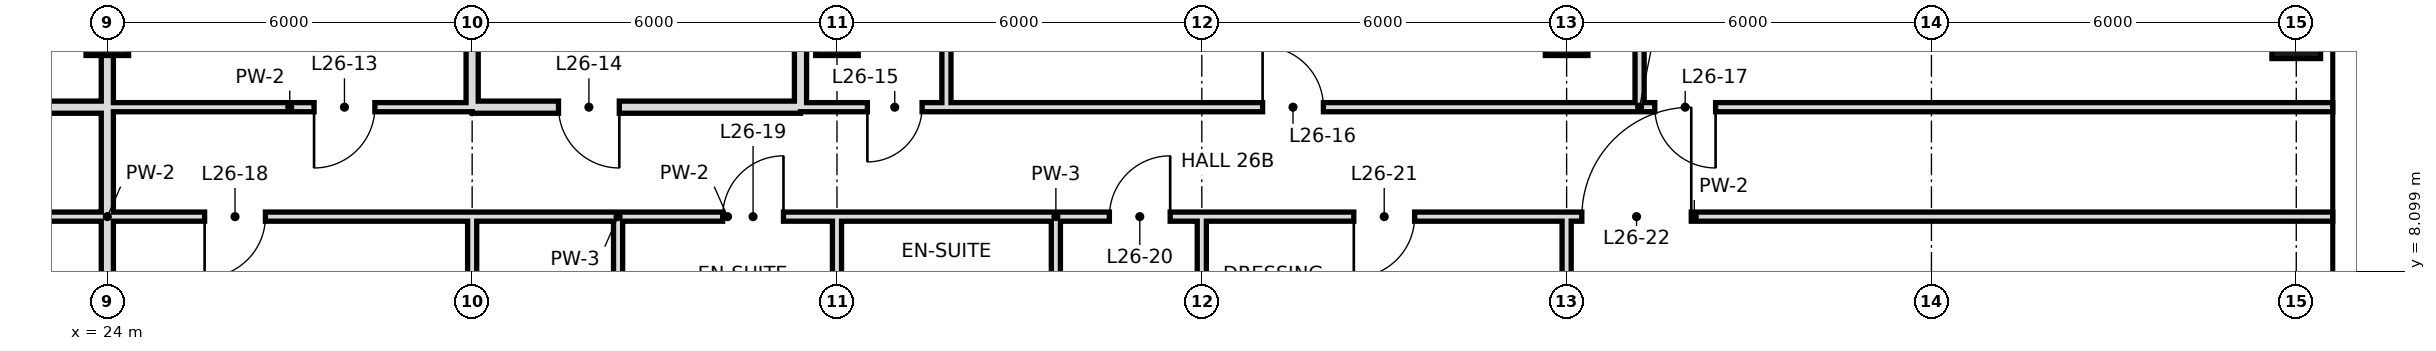
"""IFC4 building model, lengths in metres.
Left out: names, types, materials, properties, quantities, classifications, styles, units other than length and angle.
Written with IfcOpenShell. Run it as: python <this file> out.ifc"""

import sys

from ifc_helpers import new_model, si_unit, direction, frame, frame_2d, origin, origin_2d, place, context, subcontext, project, spatial, rectangle, hollow_rectangle, extrude, element, fill, save


model = new_model("IFC4")
c1 = context("Model", 3, precision=1e-05, world=origin(), true_north=direction((0.0, 1.0)))
c2 = subcontext(c1, "Body", "Model", "MODEL_VIEW")
j1 = project(units=[si_unit("LENGTHUNIT", "METRE"), si_unit("PLANEANGLEUNIT", "RADIAN")], contexts=[c1])
p1 = place(None, origin())
s1 = spatial("IfcSite", under=j1, at=p1, CompositionType="ELEMENT")
p2 = place(p1, origin())
s2 = spatial("IfcBuilding", under=s1, at=p2, CompositionType="ELEMENT")
p3 = place(p2, frame((0.0, 0.0, 119.6)))
s3 = spatial("IfcBuildingStorey", under=s2, at=p3, CompositionType="ELEMENT", Elevation=119.6)
for number, where, z_axis, x_axis in (
    (1, (24.0, 12.0, 0.0), (0.0, 0.0, 1.0), (1.0, 0.0, 0.0)),
    (2, (36.0, 12.0, 0.0), (0.0, 0.0, 1.0), (1.0, 0.0, 0.0)),
    (3, (48.0, 12.0, 0.0), (0.0, 0.0, 1.0), (1.0, 0.0, 0.0)),
):
    element("IfcColumn", number, at=place(p3, frame(where, z_axis=z_axis, x_axis=x_axis)), inside=s3, PredefinedType="COLUMN", context=c2, shape_type="SweptSolid", body=[
        extrude(hollow_rectangle(XDim=0.7, YDim=0.7, WallThickness=0.036, at=origin_2d()), origin(), (0.0, 0.0, 1.0), 3.6),
    ])
p4 = place(p3, frame((60.0, 12.0, 0.0), z_axis=(0.0, 0.0, 1.0), x_axis=(1.0, 0.0, 0.0)))
e4 = element("IfcColumn", 4, at=p4, inside=s3, PredefinedType="COLUMN", context=c2, shape_type="SweptSolid", body=[
    extrude(hollow_rectangle(XDim=0.8, YDim=0.8, WallThickness=0.04, at=origin_2d()), origin(), (0.0, 0.0, 1.0), 3.6),
])
p5 = place(p3, frame((24.0, 10.8, 0.0), z_axis=(0.0, 0.0, 1.0), x_axis=(0.0, 1.0, 0.0)))
e5 = element("IfcWall", 5, at=p5, inside=s3, PredefinedType="SOLIDWALL", context=c2, shape_type="SweptSolid", body=[
    extrude(rectangle(XDim=7.9, YDim=0.2, at=frame_2d((3.95, 0.0))), origin(), (0.0, 0.0, 1.0), 2.72),
])
p6 = place(p3, frame((24.0, 0.0, 0.0), z_axis=(0.0, 0.0, 1.0), x_axis=(0.0, 1.0, 0.0)))
e6 = element("IfcWall", 6, at=p6, inside=s3, PredefinedType="SOLIDWALL", context=c2, shape_type="SweptSolid", body=[
    extrude(rectangle(XDim=10.8, YDim=0.2, at=frame_2d((5.4, 0.0))), origin(), (0.0, 0.0, 1.0), 2.72),
])
p7 = place(p3, frame((30.0, 10.8, 0.0), z_axis=(0.0, 0.0, 1.0), x_axis=(0.0, 1.0, 0.0)))
e7 = element("IfcWall", 7, at=p7, inside=s3, PredefinedType="SOLIDWALL", context=c2, shape_type="SweptSolid", body=[
    extrude(rectangle(XDim=7.9, YDim=0.2, at=frame_2d((3.95, 0.0))), origin(), (0.0, 0.0, 1.0), 2.72),
])
p8 = place(p3, frame((30.0, 6.0, 0.0), z_axis=(0.0, 0.0, 1.0), x_axis=(0.0, 1.0, 0.0)))
e8 = element("IfcWall", 8, at=p8, inside=s3, PredefinedType="PARTITIONING", context=c2, shape_type="SweptSolid", body=[
    extrude(rectangle(XDim=3.0, YDim=0.15, at=frame_2d((1.5, 0.0))), origin(), (0.0, 0.0, 1.0), 2.72),
])
p9 = place(p3, frame((32.4, 6.0, 0.0), z_axis=(0.0, 0.0, 1.0), x_axis=(0.0, 1.0, 0.0)))
e9 = element("IfcWall", 9, at=p9, inside=s3, PredefinedType="PARTITIONING", context=c2, shape_type="SweptSolid", body=[
    extrude(rectangle(XDim=3.0, YDim=0.15, at=frame_2d((1.5, 0.0))), origin(), (0.0, 0.0, 1.0), 3.42),
])
p10 = place(p3, frame((35.4, 10.8, 0.0), z_axis=(0.0, 0.0, 1.0), x_axis=(0.0, 1.0, 0.0)))
e10 = element("IfcWall", 10, at=p10, inside=s3, PredefinedType="SOLIDWALL", context=c2, shape_type="SweptSolid", body=[
    extrude(rectangle(XDim=7.9, YDim=0.2, at=frame_2d((3.95, 0.0))), origin(), (0.0, 0.0, 1.0), 2.72),
])
p11 = place(p3, frame((36.0, 6.0, 0.0), z_axis=(0.0, 0.0, 1.0), x_axis=(0.0, 1.0, 0.0)))
e11 = element("IfcWall", 11, at=p11, inside=s3, PredefinedType="PARTITIONING", context=c2, shape_type="SweptSolid", body=[
    extrude(rectangle(XDim=3.0, YDim=0.15, at=frame_2d((1.5, 0.0))), origin(), (0.0, 0.0, 1.0), 2.72),
])
p12 = place(p3, frame((37.8, 10.8, 0.0), z_axis=(0.0, 0.0, 1.0), x_axis=(0.0, 1.0, 0.0)))
e12 = element("IfcWall", 12, at=p12, inside=s3, PredefinedType="PARTITIONING", context=c2, shape_type="SweptSolid", body=[
    extrude(rectangle(XDim=7.9, YDim=0.15, at=frame_2d((3.95, 0.0))), origin(), (0.0, 0.0, 1.0), 3.42),
])
p13 = place(p3, frame((39.6, 6.0, 0.0), z_axis=(0.0, 0.0, 1.0), x_axis=(0.0, 1.0, 0.0)))
e13 = element("IfcWall", 13, at=p13, inside=s3, PredefinedType="PARTITIONING", context=c2, shape_type="SweptSolid", body=[
    extrude(rectangle(XDim=3.0, YDim=0.15, at=frame_2d((1.5, 0.0))), origin(), (0.0, 0.0, 1.0), 3.42),
])
p14 = place(p3, frame((42.0, -0.6, 0.0), z_axis=(0.0, 0.0, 1.0), x_axis=(0.0, 1.0, 0.0)))
e14 = element("IfcWall", 14, at=p14, inside=s3, PredefinedType="PARTITIONING", context=c2, shape_type="SweptSolid", body=[
    extrude(rectangle(XDim=9.6, YDim=0.15, at=frame_2d((4.8, 0.0))), origin(), (0.0, 0.0, 1.0), 2.72),
])
p15 = place(p3, frame((48.0, 0.0, 0.0), z_axis=(0.0, 0.0, 1.0), x_axis=(0.0, 1.0, 0.0)))
e15 = element("IfcWall", 15, at=p15, inside=s3, PredefinedType="PARTITIONING", context=c2, shape_type="SweptSolid", body=[
    extrude(rectangle(XDim=9.0, YDim=0.15, at=frame_2d((4.5, 0.0))), origin(), (0.0, 0.0, 1.0), 2.72),
])
p16 = place(p3, frame((49.2, 10.8, 0.0), z_axis=(0.0, 0.0, 1.0), x_axis=(0.0, 1.0, 0.0)))
e16 = element("IfcWall", 16, at=p16, inside=s3, PredefinedType="PARTITIONING", context=c2, shape_type="SweptSolid", body=[
    extrude(rectangle(XDim=20.4, YDim=0.15, at=frame_2d((10.2, 0.0))), origin(), (0.0, 0.0, 1.0), 3.42),
])
p17 = place(p16, frame((17.68, 0.0, 0.0)))
e17 = element("IfcOpeningElement", 17, at=p17, cuts=e16, PredefinedType="OPENING", context=c2, shape_type="SweptSolid", body=[
    extrude(rectangle(XDim=1.0, YDim=2.4, at=frame_2d((0.5, 1.2))), frame((0.0, 0.085, 0.0), z_axis=(0.0, -1.0, 0.0), x_axis=(1.0, 0.0, 0.0)), (0.0, 0.0, 1.0), 0.17),
])
p18 = place(p16, frame((9.88, 0.0, 0.0)))
e18 = element("IfcOpeningElement", 18, at=p18, cuts=e16, PredefinedType="OPENING", context=c2, shape_type="SweptSolid", body=[
    extrude(rectangle(XDim=1.0, YDim=2.4, at=frame_2d((0.5, 1.2))), frame((0.0, 0.085, 0.0), z_axis=(0.0, -1.0, 0.0), x_axis=(1.0, 0.0, 0.0)), (0.0, 0.0, 1.0), 0.17),
])
p19 = place(p3, frame((18.6, 10.8, 0.0), z_axis=(0.0, 0.0, 1.0), x_axis=(1.0, 0.0, 0.0)))
e19 = element("IfcWall", 19, at=p19, inside=s3, PredefinedType="SOLIDWALL", context=c2, shape_type="SweptSolid", body=[
    extrude(rectangle(XDim=5.4, YDim=0.2, at=frame_2d((2.7, 0.0))), origin(), (0.0, 0.0, 1.0), 2.72),
])
p20 = place(p19, frame((2.2, 0.0, 0.0)))
e20 = element("IfcOpeningElement", 20, at=p20, cuts=e19, PredefinedType="OPENING", context=c2, shape_type="SweptSolid", body=[
    extrude(rectangle(XDim=1.0, YDim=2.4, at=frame_2d((0.5, 1.2))), frame((0.0, 0.11, 0.0), z_axis=(0.0, -1.0, 0.0), x_axis=(1.0, 0.0, 0.0)), (0.0, 0.0, 1.0), 0.22),
])
p21 = place(p3, frame((30.0, 10.8, 0.0), z_axis=(0.0, 0.0, 1.0), x_axis=(1.0, 0.0, 0.0)))
e21 = element("IfcWall", 21, at=p21, inside=s3, PredefinedType="SOLIDWALL", context=c2, shape_type="SweptSolid", body=[
    extrude(rectangle(XDim=5.4, YDim=0.2, at=frame_2d((2.7, 0.0))), origin(), (0.0, 0.0, 1.0), 2.72),
])
p22 = place(p21, frame((1.42, 0.0, 0.0)))
e22 = element("IfcOpeningElement", 22, at=p22, cuts=e21, PredefinedType="OPENING", context=c2, shape_type="SweptSolid", body=[
    extrude(rectangle(XDim=1.0, YDim=2.4, at=frame_2d((0.5, 1.2))), frame((0.0, 0.11, 0.0), z_axis=(0.0, -1.0, 0.0), x_axis=(1.0, 0.0, 0.0)), (0.0, 0.0, 1.0), 0.22),
])
p23 = place(p3, frame((24.0, 10.8, 0.0), z_axis=(0.0, 0.0, 1.0), x_axis=(1.0, 0.0, 0.0)))
e23 = element("IfcWall", 23, at=p23, inside=s3, PredefinedType="PARTITIONING", context=c2, shape_type="SweptSolid", body=[
    extrude(rectangle(XDim=6.0, YDim=0.15, at=frame_2d((3.0, 0.0))), origin(), (0.0, 0.0, 1.0), 3.42),
])
p24 = place(p23, frame((3.4, 0.0, 0.0)))
e24 = element("IfcOpeningElement", 24, at=p24, cuts=e23, PredefinedType="OPENING", context=c2, shape_type="SweptSolid", body=[
    extrude(rectangle(XDim=1.0, YDim=2.4, at=frame_2d((0.5, 1.2))), frame((0.0, 0.085, 0.0), z_axis=(0.0, -1.0, 0.0), x_axis=(1.0, 0.0, 0.0)), (0.0, 0.0, 1.0), 0.17),
])
p25 = place(p3, frame((37.8, 10.8, 0.0), z_axis=(0.0, 0.0, 1.0), x_axis=(1.0, 0.0, 0.0)))
e25 = element("IfcWall", 25, at=p25, inside=s3, PredefinedType="PARTITIONING", context=c2, shape_type="SweptSolid", body=[
    extrude(rectangle(XDim=22.8, YDim=0.15, at=frame_2d((11.4, 0.0))), origin(), (0.0, 0.0, 1.0), 3.42),
])
p26 = place(p25, frame((5.2, 0.0, 0.0)))
e26 = element("IfcOpeningElement", 26, at=p26, cuts=e25, PredefinedType="OPENING", context=c2, shape_type="SweptSolid", body=[
    extrude(rectangle(XDim=1.0, YDim=2.4, at=frame_2d((0.5, 1.2))), frame((0.0, 0.085, 0.0), z_axis=(0.0, -1.0, 0.0), x_axis=(1.0, 0.0, 0.0)), (0.0, 0.0, 1.0), 0.17),
])
p27 = place(p25, frame((11.65, 0.0, 0.0)))
e27 = element("IfcOpeningElement", 27, at=p27, cuts=e25, PredefinedType="OPENING", context=c2, shape_type="SweptSolid", body=[
    extrude(rectangle(XDim=1.0, YDim=2.4, at=frame_2d((0.5, 1.2))), frame((0.0, 0.085, 0.0), z_axis=(0.0, -1.0, 0.0), x_axis=(1.0, 0.0, 0.0)), (0.0, 0.0, 1.0), 0.17),
])
p28 = place(p3, frame((35.4, 10.8, 0.0), z_axis=(0.0, 0.0, 1.0), x_axis=(1.0, 0.0, 0.0)))
e28 = element("IfcWall", 28, at=p28, inside=s3, PredefinedType="PARTITIONING", context=c2, shape_type="SweptSolid", body=[
    extrude(rectangle(XDim=2.4, YDim=0.15, at=frame_2d((1.2, 0.0))), origin(), (0.0, 0.0, 1.0), 3.42),
])
p29 = place(p28, frame((1.1, 0.0, 0.0)))
e29 = element("IfcOpeningElement", 29, at=p29, cuts=e28, PredefinedType="OPENING", context=c2, shape_type="SweptSolid", body=[
    extrude(rectangle(XDim=0.9, YDim=2.4, at=frame_2d((0.45, 1.2))), frame((0.0, 0.085, 0.0), z_axis=(0.0, -1.0, 0.0), x_axis=(1.0, 0.0, 0.0)), (0.0, 0.0, 1.0), 0.17),
])
p30 = place(p3, frame((18.0, 9.0, 0.0), z_axis=(0.0, 0.0, 1.0), x_axis=(1.0, 0.0, 0.0)))
e30 = element("IfcWall", 30, at=p30, inside=s3, PredefinedType="PARTITIONING", context=c2, shape_type="SweptSolid", body=[
    extrude(rectangle(XDim=12.0, YDim=0.15, at=frame_2d((6.0, 0.0))), origin(), (0.0, 0.0, 1.0), 3.42),
])
p31 = place(p30, frame((2.1, 0.0, 0.0)))
e31 = element("IfcOpeningElement", 31, at=p31, cuts=e30, PredefinedType="OPENING", context=c2, shape_type="SweptSolid", body=[
    extrude(rectangle(XDim=1.8, YDim=2.4, at=frame_2d((0.9, 1.2))), frame((0.0, 0.085, 0.0), z_axis=(0.0, -1.0, 0.0), x_axis=(1.0, 0.0, 0.0)), (0.0, 0.0, 1.0), 0.17),
])
p32 = place(p30, frame((7.6, 0.0, 0.0)))
e32 = element("IfcOpeningElement", 32, at=p32, cuts=e30, PredefinedType="OPENING", context=c2, shape_type="SweptSolid", body=[
    extrude(rectangle(XDim=1.0, YDim=2.4, at=frame_2d((0.5, 1.2))), frame((0.0, 0.085, 0.0), z_axis=(0.0, -1.0, 0.0), x_axis=(1.0, 0.0, 0.0)), (0.0, 0.0, 1.0), 0.17),
])
p33 = place(p3, frame((32.4, 9.0, 0.0), z_axis=(0.0, 0.0, 1.0), x_axis=(1.0, 0.0, 0.0)))
e33 = element("IfcWall", 33, at=p33, inside=s3, PredefinedType="PARTITIONING", context=c2, shape_type="SweptSolid", body=[
    extrude(rectangle(XDim=3.6, YDim=0.15, at=frame_2d((1.8, 0.0))), origin(), (0.0, 0.0, 1.0), 3.42),
])
p34 = place(p33, frame((1.72, 0.0, 0.0)))
e34 = element("IfcOpeningElement", 34, at=p34, cuts=e33, PredefinedType="OPENING", context=c2, shape_type="SweptSolid", body=[
    extrude(rectangle(XDim=1.0, YDim=2.4, at=frame_2d((0.5, 1.2))), frame((0.0, 0.085, 0.0), z_axis=(0.0, -1.0, 0.0), x_axis=(1.0, 0.0, 0.0)), (0.0, 0.0, 1.0), 0.17),
])
p35 = place(p3, frame((39.6, 9.0, 0.0), z_axis=(0.0, 0.0, 1.0), x_axis=(1.0, 0.0, 0.0)))
e35 = element("IfcWall", 35, at=p35, inside=s3, PredefinedType="PARTITIONING", context=c2, shape_type="SweptSolid", body=[
    extrude(rectangle(XDim=21.0, YDim=0.15, at=frame_2d((10.5, 0.0))), origin(), (0.0, 0.0, 1.0), 3.42),
])
p36 = place(p35, frame((0.88, 0.0, 0.0)))
e36 = element("IfcOpeningElement", 36, at=p36, cuts=e35, PredefinedType="OPENING", context=c2, shape_type="SweptSolid", body=[
    extrude(rectangle(XDim=1.0, YDim=2.4, at=frame_2d((0.5, 1.2))), frame((0.0, 0.085, 0.0), z_axis=(0.0, -1.0, 0.0), x_axis=(1.0, 0.0, 0.0)), (0.0, 0.0, 1.0), 0.17),
])
p37 = place(p35, frame((4.9, 0.0, 0.0)))
e37 = element("IfcOpeningElement", 37, at=p37, cuts=e35, PredefinedType="OPENING", context=c2, shape_type="SweptSolid", body=[
    extrude(rectangle(XDim=1.0, YDim=2.4, at=frame_2d((0.5, 1.2))), frame((0.0, 0.085, 0.0), z_axis=(0.0, -1.0, 0.0), x_axis=(1.0, 0.0, 0.0)), (0.0, 0.0, 1.0), 0.17),
])
p38 = place(p35, frame((8.65, 0.0, 0.0)))
e38 = element("IfcOpeningElement", 38, at=p38, cuts=e35, PredefinedType="OPENING", context=c2, shape_type="SweptSolid", body=[
    extrude(rectangle(XDim=1.8, YDim=2.4, at=frame_2d((0.9, 1.2))), frame((0.0, 0.085, 0.0), z_axis=(0.0, -1.0, 0.0), x_axis=(1.0, 0.0, 0.0)), (0.0, 0.0, 1.0), 0.17),
])
p39 = place(p3, frame((30.0, 9.0, 0.0), z_axis=(0.0, 0.0, 1.0), x_axis=(1.0, 0.0, 0.0)))
e39 = element("IfcWall", 39, at=p39, inside=s3, PredefinedType="PARTITIONING", context=c2, shape_type="SweptSolid", body=[
    extrude(rectangle(XDim=2.4, YDim=0.15, at=frame_2d((1.2, 0.0))), origin(), (0.0, 0.0, 1.0), 3.42),
])
p40 = place(p3, frame((36.0, 9.0, 0.0), z_axis=(0.0, 0.0, 1.0), x_axis=(1.0, 0.0, 0.0)))
e40 = element("IfcWall", 40, at=p40, inside=s3, PredefinedType="PARTITIONING", context=c2, shape_type="SweptSolid", body=[
    extrude(rectangle(XDim=3.6, YDim=0.15, at=frame_2d((1.8, 0.0))), origin(), (0.0, 0.0, 1.0), 3.42),
])
p41 = place(p24, frame((1.0, 0.0, 0.0), z_axis=(0.0, 0.0, 1.0), x_axis=(-1.0, 0.0, 0.0)))
e41 = element("IfcDoor", 41, at=p41, inside=s3, OperationType="SINGLE_SWING_RIGHT", PredefinedType="DOOR", context=c2, shape_type="SweptSolid", body=[
    extrude(rectangle(XDim=1.0, YDim=2.4, at=frame_2d((0.5, 1.2))), frame((0.0, 0.025, 0.0), z_axis=(0.0, -1.0, 0.0), x_axis=(1.0, 0.0, 0.0)), (0.0, 0.0, 1.0), 0.05),
])
fill(e24, e41)
p42 = place(p22, origin())
e42 = element("IfcDoor", 42, at=p42, inside=s3, OperationType="SINGLE_SWING_RIGHT", PredefinedType="DOOR", context=c2, shape_type="SweptSolid", body=[
    extrude(rectangle(XDim=1.0, YDim=2.4, at=frame_2d((0.5, 1.2))), frame((0.0, 0.025, 0.0), z_axis=(0.0, -1.0, 0.0), x_axis=(1.0, 0.0, 0.0)), (0.0, 0.0, 1.0), 0.05),
])
fill(e22, e42)
p43 = place(p29, frame((0.9, 0.0, 0.0), z_axis=(0.0, 0.0, 1.0), x_axis=(-1.0, 0.0, 0.0)))
e43 = element("IfcDoor", 43, at=p43, inside=s3, OperationType="SINGLE_SWING_RIGHT", PredefinedType="DOOR", context=c2, shape_type="SweptSolid", body=[
    extrude(rectangle(XDim=0.9, YDim=2.4, at=frame_2d((0.45, 1.2))), frame((0.0, 0.025, 0.0), z_axis=(0.0, -1.0, 0.0), x_axis=(1.0, 0.0, 0.0)), (0.0, 0.0, 1.0), 0.05),
])
fill(e29, e43)
p44 = place(p26, origin())
e44 = element("IfcDoor", 44, at=p44, inside=s3, OperationType="SINGLE_SWING_LEFT", PredefinedType="DOOR", context=c2, shape_type="SweptSolid", body=[
    extrude(rectangle(XDim=1.0, YDim=2.4, at=frame_2d((0.5, 1.2))), frame((0.0, 0.025, 0.0), z_axis=(0.0, -1.0, 0.0), x_axis=(1.0, 0.0, 0.0)), (0.0, 0.0, 1.0), 0.05),
])
fill(e26, e44)
p45 = place(p27, origin())
e45 = element("IfcDoor", 45, at=p45, inside=s3, OperationType="SINGLE_SWING_RIGHT", PredefinedType="DOOR", context=c2, shape_type="SweptSolid", body=[
    extrude(rectangle(XDim=1.0, YDim=2.4, at=frame_2d((0.5, 1.2))), frame((0.0, 0.025, 0.0), z_axis=(0.0, -1.0, 0.0), x_axis=(1.0, 0.0, 0.0)), (0.0, 0.0, 1.0), 0.05),
])
fill(e27, e45)
p46 = place(p32, frame((1.0, 0.0, 0.0), z_axis=(0.0, 0.0, 1.0), x_axis=(-1.0, 0.0, 0.0)))
e46 = element("IfcDoor", 46, at=p46, inside=s3, OperationType="SINGLE_SWING_RIGHT", PredefinedType="DOOR", context=c2, shape_type="SweptSolid", body=[
    extrude(rectangle(XDim=1.0, YDim=2.4, at=frame_2d((0.5, 1.2))), frame((0.0, 0.025, 0.0), z_axis=(0.0, -1.0, 0.0), x_axis=(1.0, 0.0, 0.0)), (0.0, 0.0, 1.0), 0.05),
])
fill(e32, e46)
p47 = place(p34, frame((1.0, 0.0, 0.0), z_axis=(0.0, 0.0, 1.0), x_axis=(-1.0, 0.0, 0.0)))
e47 = element("IfcDoor", 47, at=p47, inside=s3, OperationType="SINGLE_SWING_LEFT", PredefinedType="DOOR", context=c2, shape_type="SweptSolid", body=[
    extrude(rectangle(XDim=1.0, YDim=2.4, at=frame_2d((0.5, 1.2))), frame((0.0, 0.025, 0.0), z_axis=(0.0, -1.0, 0.0), x_axis=(1.0, 0.0, 0.0)), (0.0, 0.0, 1.0), 0.05),
])
fill(e34, e47)
p48 = place(p36, frame((1.0, 0.0, 0.0), z_axis=(0.0, 0.0, 1.0), x_axis=(-1.0, 0.0, 0.0)))
e48 = element("IfcDoor", 48, at=p48, inside=s3, OperationType="SINGLE_SWING_LEFT", PredefinedType="DOOR", context=c2, shape_type="SweptSolid", body=[
    extrude(rectangle(XDim=1.0, YDim=2.4, at=frame_2d((0.5, 1.2))), frame((0.0, 0.025, 0.0), z_axis=(0.0, -1.0, 0.0), x_axis=(1.0, 0.0, 0.0)), (0.0, 0.0, 1.0), 0.05),
])
fill(e36, e48)
p49 = place(p37, frame((1.0, 0.0, 0.0), z_axis=(0.0, 0.0, 1.0), x_axis=(-1.0, 0.0, 0.0)))
e49 = element("IfcDoor", 49, at=p49, inside=s3, OperationType="SINGLE_SWING_RIGHT", PredefinedType="DOOR", context=c2, shape_type="SweptSolid", body=[
    extrude(rectangle(XDim=1.0, YDim=2.4, at=frame_2d((0.5, 1.2))), frame((0.0, 0.025, 0.0), z_axis=(0.0, -1.0, 0.0), x_axis=(1.0, 0.0, 0.0)), (0.0, 0.0, 1.0), 0.05),
])
fill(e37, e49)
p50 = place(p38, frame((1.8, 0.0, 0.0), z_axis=(0.0, 0.0, 1.0), x_axis=(-1.0, 0.0, 0.0)))
e50 = element("IfcDoor", 50, at=p50, inside=s3, OperationType="SINGLE_SWING_LEFT", PredefinedType="DOOR", context=c2, shape_type="SweptSolid", body=[
    extrude(rectangle(XDim=1.8, YDim=2.4, at=frame_2d((0.9, 1.2))), frame((0.0, 0.025, 0.0), z_axis=(0.0, -1.0, 0.0), x_axis=(1.0, 0.0, 0.0)), (0.0, 0.0, 1.0), 0.05),
])
fill(e38, e50)
save(model, sys.argv[1])
